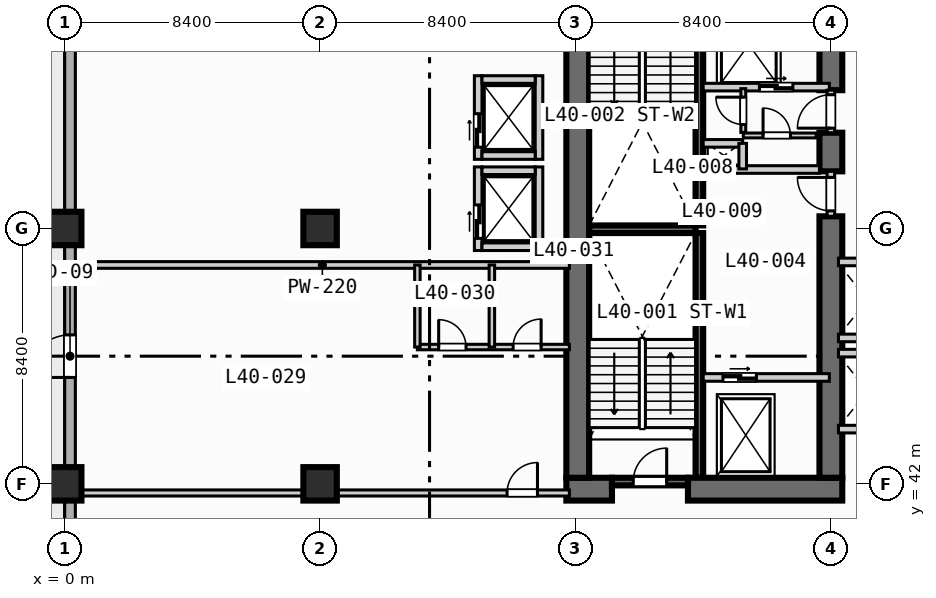
"""IFC4 building model, lengths in metres.
Left out: names, types, materials, properties, quantities, classifications, styles, units other than length and angle.
Written with IfcOpenShell. Run it as: python <this file> out.ifc"""

import sys

from ifc_helpers import new_model, si_unit, direction, frame, frame_2d, origin, origin_2d, place, context, subcontext, project, spatial, rectangle, extrude, element, fill, save


model = new_model("IFC4")
c1 = context("Model", 3, precision=1e-05, world=origin(), true_north=direction((0.0, 1.0)))
c2 = subcontext(c1, "Body", "Model", "MODEL_VIEW")
j1 = project(units=[si_unit("LENGTHUNIT", "METRE"), si_unit("PLANEANGLEUNIT", "RADIAN")], contexts=[c1])
p1 = place(None, origin())
s1 = spatial("IfcSite", under=j1, at=p1, CompositionType="ELEMENT")
p2 = place(p1, origin())
s2 = spatial("IfcBuilding", under=s1, at=p2, CompositionType="ELEMENT")
p3 = place(p2, frame((0.0, 0.0, 168.0)))
s3 = spatial("IfcBuildingStorey", under=s2, at=p3, CompositionType="ELEMENT", Elevation=168.0)
for number, where, z_axis, x_axis in (
    (1, (20.875, 42.2, 0.0), (0.0, 0.0, 1.0), (0.0, 1.0, 0.0)),
    (2, (20.875, 50.5, 0.0), (0.0, 0.0, 1.0), (0.0, 1.0, 0.0)),
):
    element("IfcWall", number, at=place(p3, frame(where, z_axis=z_axis, x_axis=x_axis)), inside=s3, PredefinedType="SOLIDWALL", context=c2, shape_type="SweptSolid", body=[
        extrude(rectangle(XDim=8.05, YDim=0.25, at=frame_2d((4.025, 0.0))), origin(), (0.0, 0.0, 1.0), 3.47),
    ])
p4 = place(p3, frame((17.25, 50.375, 0.0), z_axis=(0.0, 0.0, 1.0), x_axis=(1.0, 0.0, 0.0)))
e3 = element("IfcWall", 3, at=p4, inside=s3, PredefinedType="SOLIDWALL", context=c2, shape_type="SweptSolid", body=[
    extrude(rectangle(XDim=3.5, YDim=0.25, at=frame_2d((1.75, 0.0))), origin(), (0.0, 0.0, 1.0), 3.47),
])
p5 = place(p3, frame((16.5, 41.825, 0.0), z_axis=(0.0, 0.0, 1.0), x_axis=(1.0, 0.0, 0.0)))
e4 = element("IfcWall", 4, at=p5, inside=s3, PredefinedType="SHEAR", context=c2, shape_type="SweptSolid", body=[
    extrude(rectangle(XDim=1.5, YDim=0.75, at=frame_2d((0.75, 0.0))), origin(), (0.0, 0.0, 1.0), 3.47),
])
p6 = place(p3, frame((20.5, 41.825, 0.0), z_axis=(0.0, 0.0, 1.0), x_axis=(1.0, 0.0, 0.0)))
e5 = element("IfcWall", 5, at=p6, inside=s3, PredefinedType="SHEAR", context=c2, shape_type="SweptSolid", body=[
    extrude(rectangle(XDim=5.075, YDim=0.75, at=frame_2d((2.538, 0.0))), origin(), (0.0, 0.0, 1.0), 3.47),
])
p7 = place(p3, frame((16.875, 42.2, 0.0), z_axis=(0.0, 0.0, 1.0), x_axis=(0.0, 1.0, 0.0)))
e6 = element("IfcWall", 6, at=p7, inside=s3, PredefinedType="SHEAR", context=c2, shape_type="SweptSolid", body=[
    extrude(rectangle(XDim=16.35, YDim=0.75, at=frame_2d((8.175, 0.0))), origin(), (0.0, 0.0, 1.0), 3.47),
])
p8 = place(p3, frame((25.2, 42.2, 0.0), z_axis=(0.0, 0.0, 1.0), x_axis=(0.0, 1.0, 0.0)))
e7 = element("IfcWall", 7, at=p8, inside=s3, PredefinedType="SHEAR", context=c2, shape_type="SweptSolid", body=[
    extrude(rectangle(XDim=8.6, YDim=0.75, at=frame_2d((4.3, 0.0))), origin(), (0.0, 0.0, 1.0), 3.47),
])
p9 = place(p3, frame((25.2, 52.28, 0.0), z_axis=(0.0, 0.0, 1.0), x_axis=(0.0, 1.0, 0.0)))
e8 = element("IfcWall", 8, at=p9, inside=s3, PredefinedType="SHEAR", context=c2, shape_type="SweptSolid", body=[
    extrude(rectangle(XDim=1.27, YDim=0.75, at=frame_2d((0.635, 0.0))), origin(), (0.0, 0.0, 1.0), 3.47),
])
p10 = place(p3, frame((25.2, 54.95, 0.0), z_axis=(0.0, 0.0, 1.0), x_axis=(0.0, 1.0, 0.0)))
e9 = element("IfcWall", 9, at=p10, inside=s3, PredefinedType="SHEAR", context=c2, shape_type="SweptSolid", body=[
    extrude(rectangle(XDim=3.6, YDim=0.75, at=frame_2d((1.8, 0.0))), origin(), (0.0, 0.0, 1.0), 3.47),
])
for number, where, z_axis, x_axis in (
    (10, (0.0, 42.0, 0.0), (0.0, 0.0, 1.0), (1.0, 0.0, 0.0)),
    (11, (0.0, 50.4, 0.0), (0.0, 0.0, 1.0), (1.0, 0.0, 0.0)),
    (12, (8.4, 42.0, 0.0), (0.0, 0.0, 1.0), (1.0, 0.0, 0.0)),
    (13, (8.4, 50.4, 0.0), (0.0, 0.0, 1.0), (1.0, 0.0, 0.0)),
):
    element("IfcColumn", number, at=place(p3, frame(where, z_axis=z_axis, x_axis=x_axis)), inside=s3, PredefinedType="COLUMN", context=c2, shape_type="SweptSolid", body=[
        extrude(rectangle(XDim=1.1, YDim=1.1, at=origin_2d()), origin(), (0.0, 0.0, 1.0), 3.7),
    ])
p11 = place(p3, frame((0.175, 3.175, 0.0), z_axis=(0.0, 0.0, 1.0), x_axis=(0.0, 1.0, 0.0)))
e14 = element("IfcWall", 14, at=p11, inside=s3, PredefinedType="STANDARD", context=c2, shape_type="SweptSolid", body=[
    extrude(rectangle(XDim=69.25, YDim=0.35, at=frame_2d((34.625, 0.0))), origin(), (0.0, 0.0, 1.0), 3.47),
])
p12 = place(p11, frame((42.325, 0.0, 0.0)))
e15 = element("IfcOpeningElement", 15, at=p12, cuts=e14, PredefinedType="OPENING", context=c2, shape_type="SweptSolid", body=[
    extrude(rectangle(XDim=1.4, YDim=2.2, at=frame_2d((0.7, 1.1))), frame((0.0, 0.185, 0.0), z_axis=(0.0, -1.0, 0.0), x_axis=(1.0, 0.0, 0.0)), (0.0, 0.0, 1.0), 0.37),
])
p13 = place(p11, frame((25.025, 0.0, 0.85)))
e16 = element("IfcOpeningElement", 16, at=p13, cuts=e14, PredefinedType="OPENING", context=c2, shape_type="SweptSolid", body=[
    extrude(rectangle(XDim=2.4, YDim=1.95, at=frame_2d((1.2, 0.975))), frame((0.0, 0.185, 0.0), z_axis=(0.0, -1.0, 0.0), x_axis=(1.0, 0.0, 0.0)), (0.0, 0.0, 1.0), 0.37),
])
p14 = place(p11, frame((33.725, 0.0, 0.85)))
e17 = element("IfcOpeningElement", 17, at=p14, cuts=e14, PredefinedType="OPENING", context=c2, shape_type="SweptSolid", body=[
    extrude(rectangle(XDim=1.8, YDim=1.8, at=frame_2d((0.9, 0.9))), frame((0.0, 0.185, 0.0), z_axis=(0.0, -1.0, 0.0), x_axis=(1.0, 0.0, 0.0)), (0.0, 0.0, 1.0), 0.37),
])
p15 = place(p11, frame((58.625, 0.0, 0.85)))
e18 = element("IfcOpeningElement", 18, at=p15, cuts=e14, PredefinedType="OPENING", context=c2, shape_type="SweptSolid", body=[
    extrude(rectangle(XDim=2.4, YDim=1.95, at=frame_2d((1.2, 0.975))), frame((0.0, 0.185, 0.0), z_axis=(0.0, -1.0, 0.0), x_axis=(1.0, 0.0, 0.0)), (0.0, 0.0, 1.0), 0.37),
])
p16 = place(p3, frame((18.0, 42.075, 0.0), z_axis=(0.0, 0.0, 1.0), x_axis=(1.0, 0.0, 0.0)))
e19 = element("IfcWall", 19, at=p16, inside=s3, PredefinedType="SOLIDWALL", context=c2, shape_type="SweptSolid", body=[
    extrude(rectangle(XDim=2.5, YDim=0.25, at=frame_2d((1.25, 0.0))), origin(), (0.0, 0.0, 1.0), 3.47),
])
p17 = place(p16, frame((0.7, 0.0, 0.0)))
e20 = element("IfcOpeningElement", 20, at=p17, cuts=e19, PredefinedType="OPENING", context=c2, shape_type="SweptSolid", body=[
    extrude(rectangle(XDim=1.1, YDim=2.15, at=frame_2d((0.55, 1.075))), frame((0.0, 0.135, 0.0), z_axis=(0.0, -1.0, 0.0), x_axis=(1.0, 0.0, 0.0)), (0.0, 0.0, 1.0), 0.27),
])
p18 = place(p3, frame((21.0, 45.5, 0.0), z_axis=(0.0, 0.0, 1.0), x_axis=(1.0, 0.0, 0.0)))
e21 = element("IfcWall", 21, at=p18, inside=s3, PredefinedType="SOLIDWALL", context=c2, shape_type="SweptSolid", body=[
    extrude(rectangle(XDim=4.15, YDim=0.25, at=frame_2d((2.075, 0.0))), origin(), (0.0, 0.0, 1.0), 3.47),
])
p19 = place(p18, frame((0.65, 0.0, 0.0)))
e22 = element("IfcOpeningElement", 22, at=p19, cuts=e21, PredefinedType="OPENING", context=c2, shape_type="SweptSolid", body=[
    extrude(rectangle(XDim=1.1, YDim=2.15, at=frame_2d((0.55, 1.075))), frame((0.0, 0.135, 0.0), z_axis=(0.0, -1.0, 0.0), x_axis=(1.0, 0.0, 0.0)), (0.0, 0.0, 1.0), 0.27),
])
p20 = place(p3, frame((25.2, 50.8, 0.0), z_axis=(0.0, 0.0, 1.0), x_axis=(0.0, 1.0, 0.0)))
e23 = element("IfcWall", 23, at=p20, inside=s3, PredefinedType="SOLIDWALL", context=c2, shape_type="SweptSolid", body=[
    extrude(rectangle(XDim=1.48, YDim=0.25, at=frame_2d((0.74, 0.0))), origin(), (0.0, 0.0, 1.0), 3.47),
])
p21 = place(p20, frame((0.18, 0.0, 0.0)))
e24 = element("IfcOpeningElement", 24, at=p21, cuts=e23, PredefinedType="OPENING", context=c2, shape_type="SweptSolid", body=[
    extrude(rectangle(XDim=1.1, YDim=2.15, at=frame_2d((0.55, 1.075))), frame((0.0, 0.135, 0.0), z_axis=(0.0, -1.0, 0.0), x_axis=(1.0, 0.0, 0.0)), (0.0, 0.0, 1.0), 0.27),
])
p22 = place(p3, frame((21.0, 52.34, 0.0), z_axis=(0.0, 0.0, 1.0), x_axis=(1.0, 0.0, 0.0)))
e25 = element("IfcWall", 25, at=p22, inside=s3, PredefinedType="SOLIDWALL", context=c2, shape_type="SweptSolid", body=[
    extrude(rectangle(XDim=3.825, YDim=0.25, at=frame_2d((1.913, 0.0))), origin(), (0.0, 0.0, 1.0), 3.47),
])
p23 = place(p3, frame((21.0, 55.05, 0.0), z_axis=(0.0, 0.0, 1.0), x_axis=(1.0, 0.0, 0.0)))
e26 = element("IfcWall", 26, at=p23, inside=s3, PredefinedType="SOLIDWALL", context=c2, shape_type="SweptSolid", body=[
    extrude(rectangle(XDim=4.15, YDim=0.25, at=frame_2d((2.075, 0.0))), origin(), (0.0, 0.0, 1.0), 3.47),
])
p24 = place(p23, frame((1.85, 0.0, 0.0)))
e27 = element("IfcOpeningElement", 27, at=p24, cuts=e26, PredefinedType="OPENING", context=c2, shape_type="SweptSolid", body=[
    extrude(rectangle(XDim=1.1, YDim=2.15, at=frame_2d((0.55, 1.075))), frame((0.0, 0.135, 0.0), z_axis=(0.0, -1.0, 0.0), x_axis=(1.0, 0.0, 0.0)), (0.0, 0.0, 1.0), 0.27),
])
p25 = place(p3, frame((25.2, 53.55, 0.0), z_axis=(0.0, 0.0, 1.0), x_axis=(0.0, 1.0, 0.0)))
e28 = element("IfcWall", 28, at=p25, inside=s3, PredefinedType="SOLIDWALL", context=c2, shape_type="SweptSolid", body=[
    extrude(rectangle(XDim=1.4, YDim=0.25, at=frame_2d((0.7, 0.0))), origin(), (0.0, 0.0, 1.0), 3.47),
])
p26 = place(p25, frame((0.15, 0.0, 0.0)))
e29 = element("IfcOpeningElement", 29, at=p26, cuts=e28, PredefinedType="OPENING", context=c2, shape_type="SweptSolid", body=[
    extrude(rectangle(XDim=1.1, YDim=2.15, at=frame_2d((0.55, 1.075))), frame((0.0, 0.135, 0.0), z_axis=(0.0, -1.0, 0.0), x_axis=(1.0, 0.0, 0.0)), (0.0, 0.0, 1.0), 0.27),
])
p27 = place(p3, frame((21.0, 53.2, 0.0), z_axis=(0.0, 0.0, 1.0), x_axis=(1.0, 0.0, 0.0)))
e30 = element("IfcWall", 30, at=p27, inside=s3, PredefinedType="SOLIDWALL", context=c2, shape_type="SweptSolid", body=[
    extrude(rectangle(XDim=1.3, YDim=0.25, at=frame_2d((0.65, 0.0))), origin(), (0.0, 0.0, 1.0), 3.47),
])
p28 = place(p3, frame((22.3, 52.36, 0.0), z_axis=(0.0, 0.0, 1.0), x_axis=(0.0, 1.0, 0.0)))
e31 = element("IfcWall", 31, at=p28, inside=s3, PredefinedType="SOLIDWALL", context=c2, shape_type="SweptSolid", body=[
    extrude(rectangle(XDim=0.84, YDim=0.25, at=frame_2d((0.42, 0.0))), origin(), (0.0, 0.0, 1.0), 3.47),
])
p29 = place(p3, frame((22.32, 53.56, 0.0), z_axis=(0.0, 0.0, 1.0), x_axis=(0.0, 1.0, 0.0)))
e32 = element("IfcWall", 32, at=p29, inside=s3, PredefinedType="PARTITIONING", context=c2, shape_type="SweptSolid", body=[
    extrude(rectangle(XDim=1.44, YDim=0.16, at=frame_2d((0.72, 0.0))), origin(), (0.0, 0.0, 1.0), 3.47),
])
p30 = place(p29, frame((0.26, 0.0, 0.0)))
e33 = element("IfcOpeningElement", 33, at=p30, cuts=e32, PredefinedType="OPENING", context=c2, shape_type="SweptSolid", body=[
    extrude(rectangle(XDim=0.9, YDim=2.1, at=frame_2d((0.45, 1.05))), frame((0.0, 0.09, 0.0), z_axis=(0.0, -1.0, 0.0), x_axis=(1.0, 0.0, 0.0)), (0.0, 0.0, 1.0), 0.18),
])
p31 = place(p3, frame((22.32, 53.46, 0.0), z_axis=(0.0, 0.0, 1.0), x_axis=(1.0, 0.0, 0.0)))
e34 = element("IfcWall", 34, at=p31, inside=s3, PredefinedType="PARTITIONING", context=c2, shape_type="SweptSolid", body=[
    extrude(rectangle(XDim=2.4, YDim=0.16, at=frame_2d((1.2, 0.0))), origin(), (0.0, 0.0, 1.0), 3.47),
])
p32 = place(p31, frame((0.65, 0.0, 0.0)))
e35 = element("IfcOpeningElement", 35, at=p32, cuts=e34, PredefinedType="OPENING", context=c2, shape_type="SweptSolid", body=[
    extrude(rectangle(XDim=0.9, YDim=2.1, at=frame_2d((0.45, 1.05))), frame((0.0, 0.09, 0.0), z_axis=(0.0, -1.0, 0.0), x_axis=(1.0, 0.0, 0.0)), (0.0, 0.0, 1.0), 0.18),
])
p33 = place(p3, frame((13.6, 49.675, 0.0), z_axis=(0.0, 0.0, 1.0), x_axis=(0.0, 1.0, 0.0)))
e36 = element("IfcWall", 36, at=p33, inside=s3, PredefinedType="SOLIDWALL", context=c2, shape_type="SweptSolid", body=[
    extrude(rectangle(XDim=2.75, YDim=0.25, at=frame_2d((1.375, 0.0))), origin(), (0.0, 0.0, 1.0), 3.47),
])
p34 = place(p33, frame((0.4, 0.0, 0.0)))
e37 = element("IfcOpeningElement", 37, at=p34, cuts=e36, PredefinedType="OPENING", context=c2, shape_type="SweptSolid", body=[
    extrude(rectangle(XDim=1.1, YDim=2.15, at=frame_2d((0.55, 1.075))), frame((0.0, 0.135, 0.0), z_axis=(0.0, -1.0, 0.0), x_axis=(1.0, 0.0, 0.0)), (0.0, 0.0, 1.0), 0.27),
])
p35 = place(p3, frame((15.6, 49.675, 0.0), z_axis=(0.0, 0.0, 1.0), x_axis=(0.0, 1.0, 0.0)))
e38 = element("IfcWall", 38, at=p35, inside=s3, PredefinedType="SOLIDWALL", context=c2, shape_type="SweptSolid", body=[
    extrude(rectangle(XDim=2.75, YDim=0.25, at=frame_2d((1.375, 0.0))), origin(), (0.0, 0.0, 1.0), 3.47),
])
for number, where, z_axis, x_axis in (
    (39, (13.725, 49.8, 0.0), (0.0, 0.0, 1.0), (1.0, 0.0, 0.0)),
    (40, (13.725, 52.3, 0.0), (0.0, 0.0, 1.0), (1.0, 0.0, 0.0)),
):
    element("IfcWall", number, at=place(p3, frame(where, z_axis=z_axis, x_axis=x_axis)), inside=s3, PredefinedType="SOLIDWALL", context=c2, shape_type="SweptSolid", body=[
        extrude(rectangle(XDim=1.75, YDim=0.25, at=frame_2d((0.875, 0.0))), origin(), (0.0, 0.0, 1.0), 3.47),
    ])
p36 = place(p3, frame((13.6, 52.675, 0.0), z_axis=(0.0, 0.0, 1.0), x_axis=(0.0, 1.0, 0.0)))
e41 = element("IfcWall", 41, at=p36, inside=s3, PredefinedType="SOLIDWALL", context=c2, shape_type="SweptSolid", body=[
    extrude(rectangle(XDim=2.75, YDim=0.25, at=frame_2d((1.375, 0.0))), origin(), (0.0, 0.0, 1.0), 3.47),
])
p37 = place(p36, frame((0.4, 0.0, 0.0)))
e42 = element("IfcOpeningElement", 42, at=p37, cuts=e41, PredefinedType="OPENING", context=c2, shape_type="SweptSolid", body=[
    extrude(rectangle(XDim=1.1, YDim=2.15, at=frame_2d((0.55, 1.075))), frame((0.0, 0.135, 0.0), z_axis=(0.0, -1.0, 0.0), x_axis=(1.0, 0.0, 0.0)), (0.0, 0.0, 1.0), 0.27),
])
p38 = place(p3, frame((15.6, 52.675, 0.0), z_axis=(0.0, 0.0, 1.0), x_axis=(0.0, 1.0, 0.0)))
e43 = element("IfcWall", 43, at=p38, inside=s3, PredefinedType="SOLIDWALL", context=c2, shape_type="SweptSolid", body=[
    extrude(rectangle(XDim=2.75, YDim=0.25, at=frame_2d((1.375, 0.0))), origin(), (0.0, 0.0, 1.0), 3.47),
])
for number, where, z_axis, x_axis in (
    (44, (13.725, 52.8, 0.0), (0.0, 0.0, 1.0), (1.0, 0.0, 0.0)),
    (45, (13.725, 55.3, 0.0), (0.0, 0.0, 1.0), (1.0, 0.0, 0.0)),
):
    element("IfcWall", number, at=place(p3, frame(where, z_axis=z_axis, x_axis=x_axis)), inside=s3, PredefinedType="SOLIDWALL", context=c2, shape_type="SweptSolid", body=[
        extrude(rectangle(XDim=1.75, YDim=0.25, at=frame_2d((0.875, 0.0))), origin(), (0.0, 0.0, 1.0), 3.47),
    ])
for number, where, z_axis, x_axis in (
    (46, (25.45, 43.8, 0.0), (0.0, 0.0, 1.0), (1.0, 0.0, 0.0)),
    (47, (25.45, 46.3, 0.0), (0.0, 0.0, 1.0), (1.0, 0.0, 0.0)),
    (48, (25.45, 46.8, 0.0), (0.0, 0.0, 1.0), (1.0, 0.0, 0.0)),
    (49, (25.45, 49.3, 0.0), (0.0, 0.0, 1.0), (1.0, 0.0, 0.0)),
):
    element("IfcWall", number, at=place(p3, frame(where, z_axis=z_axis, x_axis=x_axis)), inside=s3, PredefinedType="SOLIDWALL", context=c2, shape_type="SweptSolid", body=[
        extrude(rectangle(XDim=1.825, YDim=0.25, at=frame_2d((0.913, 0.0))), origin(), (0.0, 0.0, 1.0), 3.47),
    ])
p39 = place(p3, frame((0.35, 41.7, 0.0), z_axis=(0.0, 0.0, 1.0), x_axis=(1.0, 0.0, 0.0)))
e50 = element("IfcWall", 50, at=p39, inside=s3, PredefinedType="PARTITIONING", context=c2, shape_type="SweptSolid", body=[
    extrude(rectangle(XDim=16.25, YDim=0.2, at=frame_2d((8.125, 0.0))), origin(), (0.0, 0.0, 1.0), 2.82),
])
p40 = place(p39, frame((14.2, 0.0, 0.0)))
e51 = element("IfcOpeningElement", 51, at=p40, cuts=e50, PredefinedType="OPENING", context=c2, shape_type="SweptSolid", body=[
    extrude(rectangle(XDim=1.0, YDim=2.15, at=frame_2d((0.5, 1.075))), frame((0.0, 0.11, 0.0), z_axis=(0.0, -1.0, 0.0), x_axis=(1.0, 0.0, 0.0)), (0.0, 0.0, 1.0), 0.22),
])
p41 = place(p3, frame((0.35, 49.2, 0.0), z_axis=(0.0, 0.0, 1.0), x_axis=(1.0, 0.0, 0.0)))
e52 = element("IfcWall", 52, at=p41, inside=s3, PredefinedType="PARTITIONING", context=c2, shape_type="SweptSolid", body=[
    extrude(rectangle(XDim=16.25, YDim=0.22, at=frame_2d((8.125, 0.0))), origin(), (0.0, 0.0, 1.0), 3.47),
])
p42 = place(p3, frame((11.6, 46.5, 0.0), z_axis=(0.0, 0.0, 1.0), x_axis=(1.0, 0.0, 0.0)))
e53 = element("IfcWall", 53, at=p42, inside=s3, PredefinedType="PLUMBINGWALL", context=c2, shape_type="SweptSolid", body=[
    extrude(rectangle(XDim=5.0, YDim=0.18, at=frame_2d((2.5, 0.0))), origin(), (0.0, 0.0, 1.0), 3.47),
])
p43 = place(p42, frame((0.7, 0.0, 0.0)))
e54 = element("IfcOpeningElement", 54, at=p43, cuts=e53, PredefinedType="OPENING", context=c2, shape_type="SweptSolid", body=[
    extrude(rectangle(XDim=0.9, YDim=2.1, at=frame_2d((0.45, 1.05))), frame((0.0, 0.1, 0.0), z_axis=(0.0, -1.0, 0.0), x_axis=(1.0, 0.0, 0.0)), (0.0, 0.0, 1.0), 0.2),
])
p44 = place(p42, frame((3.15, 0.0, 0.0)))
e55 = element("IfcOpeningElement", 55, at=p44, cuts=e53, PredefinedType="OPENING", context=c2, shape_type="SweptSolid", body=[
    extrude(rectangle(XDim=0.92, YDim=2.1, at=frame_2d((0.46, 1.05))), frame((0.0, 0.1, 0.0), z_axis=(0.0, -1.0, 0.0), x_axis=(1.0, 0.0, 0.0)), (0.0, 0.0, 1.0), 0.2),
])
for number, where, z_axis, x_axis in (
    (56, (11.6, 46.5, 0.0), (0.0, 0.0, 1.0), (0.0, 1.0, 0.0)),
    (57, (14.05, 46.5, 0.0), (0.0, 0.0, 1.0), (0.0, 1.0, 0.0)),
):
    element("IfcWall", number, at=place(p3, frame(where, z_axis=z_axis, x_axis=x_axis)), inside=s3, PredefinedType="PLUMBINGWALL", context=c2, shape_type="SweptSolid", body=[
        extrude(rectangle(XDim=2.7, YDim=0.18, at=frame_2d((1.35, 0.0))), origin(), (0.0, 0.0, 1.0), 3.47),
    ])
p45 = place(p12, origin())
e58 = element("IfcDoor", 58, at=p45, inside=s3, OperationType="SINGLE_SWING_LEFT", PredefinedType="DOOR", context=c2, shape_type="SweptSolid", body=[
    extrude(rectangle(XDim=1.4, YDim=2.2, at=frame_2d((0.7, 1.1))), frame((0.0, 0.025, 0.0), z_axis=(0.0, -1.0, 0.0), x_axis=(1.0, 0.0, 0.0)), (0.0, 0.0, 1.0), 0.05),
])
fill(e15, e58)
p46 = place(p17, origin())
e59 = element("IfcDoor", 59, at=p46, inside=s3, OperationType="SINGLE_SWING_RIGHT", PredefinedType="DOOR", context=c2, shape_type="SweptSolid", body=[
    extrude(rectangle(XDim=1.1, YDim=2.15, at=frame_2d((0.55, 1.075))), frame((0.0, 0.025, 0.0), z_axis=(0.0, -1.0, 0.0), x_axis=(1.0, 0.0, 0.0)), (0.0, 0.0, 1.0), 0.05),
])
fill(e20, e59)
p47 = place(p19, origin())
e60 = element("IfcDoor", 60, at=p47, inside=s3, OperationType="SLIDING_TO_LEFT", PredefinedType="DOOR", context=c2, shape_type="SweptSolid", body=[
    extrude(rectangle(XDim=1.1, YDim=2.15, at=frame_2d((0.55, 1.075))), frame((0.0, 0.025, 0.0), z_axis=(0.0, -1.0, 0.0), x_axis=(1.0, 0.0, 0.0)), (0.0, 0.0, 1.0), 0.05),
])
fill(e22, e60)
p48 = place(p21, origin())
e61 = element("IfcDoor", 61, at=p48, inside=s3, OperationType="SINGLE_SWING_RIGHT", PredefinedType="DOOR", context=c2, shape_type="SweptSolid", body=[
    extrude(rectangle(XDim=1.1, YDim=2.15, at=frame_2d((0.55, 1.075))), frame((0.0, 0.025, 0.0), z_axis=(0.0, -1.0, 0.0), x_axis=(1.0, 0.0, 0.0)), (0.0, 0.0, 1.0), 0.05),
])
fill(e24, e61)
p49 = place(p24, origin())
e62 = element("IfcDoor", 62, at=p49, inside=s3, OperationType="SLIDING_TO_LEFT", PredefinedType="DOOR", context=c2, shape_type="SweptSolid", body=[
    extrude(rectangle(XDim=1.1, YDim=2.15, at=frame_2d((0.55, 1.075))), frame((0.0, 0.025, 0.0), z_axis=(0.0, -1.0, 0.0), x_axis=(1.0, 0.0, 0.0)), (0.0, 0.0, 1.0), 0.05),
])
fill(e27, e62)
p50 = place(p26, origin())
e63 = element("IfcDoor", 63, at=p50, inside=s3, OperationType="SINGLE_SWING_LEFT", PredefinedType="DOOR", context=c2, shape_type="SweptSolid", body=[
    extrude(rectangle(XDim=1.1, YDim=2.15, at=frame_2d((0.55, 1.075))), frame((0.0, 0.025, 0.0), z_axis=(0.0, -1.0, 0.0), x_axis=(1.0, 0.0, 0.0)), (0.0, 0.0, 1.0), 0.05),
])
fill(e29, e63)
p51 = place(p30, origin())
e64 = element("IfcDoor", 64, at=p51, inside=s3, OperationType="SINGLE_SWING_RIGHT", PredefinedType="DOOR", context=c2, shape_type="SweptSolid", body=[
    extrude(rectangle(XDim=0.9, YDim=2.1, at=frame_2d((0.45, 1.05))), frame((0.0, 0.025, 0.0), z_axis=(0.0, -1.0, 0.0), x_axis=(1.0, 0.0, 0.0)), (0.0, 0.0, 1.0), 0.05),
])
fill(e33, e64)
p52 = place(p32, origin())
e65 = element("IfcDoor", 65, at=p52, inside=s3, OperationType="SINGLE_SWING_LEFT", PredefinedType="DOOR", context=c2, shape_type="SweptSolid", body=[
    extrude(rectangle(XDim=0.9, YDim=2.1, at=frame_2d((0.45, 1.05))), frame((0.0, 0.025, 0.0), z_axis=(0.0, -1.0, 0.0), x_axis=(1.0, 0.0, 0.0)), (0.0, 0.0, 1.0), 0.05),
])
fill(e35, e65)
p53 = place(p34, origin())
e66 = element("IfcDoor", 66, at=p53, inside=s3, OperationType="SLIDING_TO_LEFT", PredefinedType="DOOR", context=c2, shape_type="SweptSolid", body=[
    extrude(rectangle(XDim=1.1, YDim=2.15, at=frame_2d((0.55, 1.075))), frame((0.0, 0.025, 0.0), z_axis=(0.0, -1.0, 0.0), x_axis=(1.0, 0.0, 0.0)), (0.0, 0.0, 1.0), 0.05),
])
fill(e37, e66)
p54 = place(p37, origin())
e67 = element("IfcDoor", 67, at=p54, inside=s3, OperationType="SLIDING_TO_LEFT", PredefinedType="DOOR", context=c2, shape_type="SweptSolid", body=[
    extrude(rectangle(XDim=1.1, YDim=2.15, at=frame_2d((0.55, 1.075))), frame((0.0, 0.025, 0.0), z_axis=(0.0, -1.0, 0.0), x_axis=(1.0, 0.0, 0.0)), (0.0, 0.0, 1.0), 0.05),
])
fill(e42, e67)
p55 = place(p40, origin())
e68 = element("IfcDoor", 68, at=p55, inside=s3, OperationType="SINGLE_SWING_RIGHT", PredefinedType="DOOR", context=c2, shape_type="SweptSolid", body=[
    extrude(rectangle(XDim=1.0, YDim=2.15, at=frame_2d((0.5, 1.075))), frame((0.0, 0.025, 0.0), z_axis=(0.0, -1.0, 0.0), x_axis=(1.0, 0.0, 0.0)), (0.0, 0.0, 1.0), 0.05),
])
fill(e51, e68)
p56 = place(p43, origin())
e69 = element("IfcDoor", 69, at=p56, inside=s3, OperationType="SINGLE_SWING_LEFT", PredefinedType="DOOR", context=c2, shape_type="SweptSolid", body=[
    extrude(rectangle(XDim=0.9, YDim=2.1, at=frame_2d((0.45, 1.05))), frame((0.0, 0.025, 0.0), z_axis=(0.0, -1.0, 0.0), x_axis=(1.0, 0.0, 0.0)), (0.0, 0.0, 1.0), 0.05),
])
fill(e54, e69)
p57 = place(p44, origin())
e70 = element("IfcDoor", 70, at=p57, inside=s3, OperationType="SINGLE_SWING_RIGHT", PredefinedType="DOOR", context=c2, shape_type="SweptSolid", body=[
    extrude(rectangle(XDim=0.92, YDim=2.1, at=frame_2d((0.46, 1.05))), frame((0.0, 0.025, 0.0), z_axis=(0.0, -1.0, 0.0), x_axis=(1.0, 0.0, 0.0)), (0.0, 0.0, 1.0), 0.05),
])
fill(e55, e70)
save(model, sys.argv[1])
